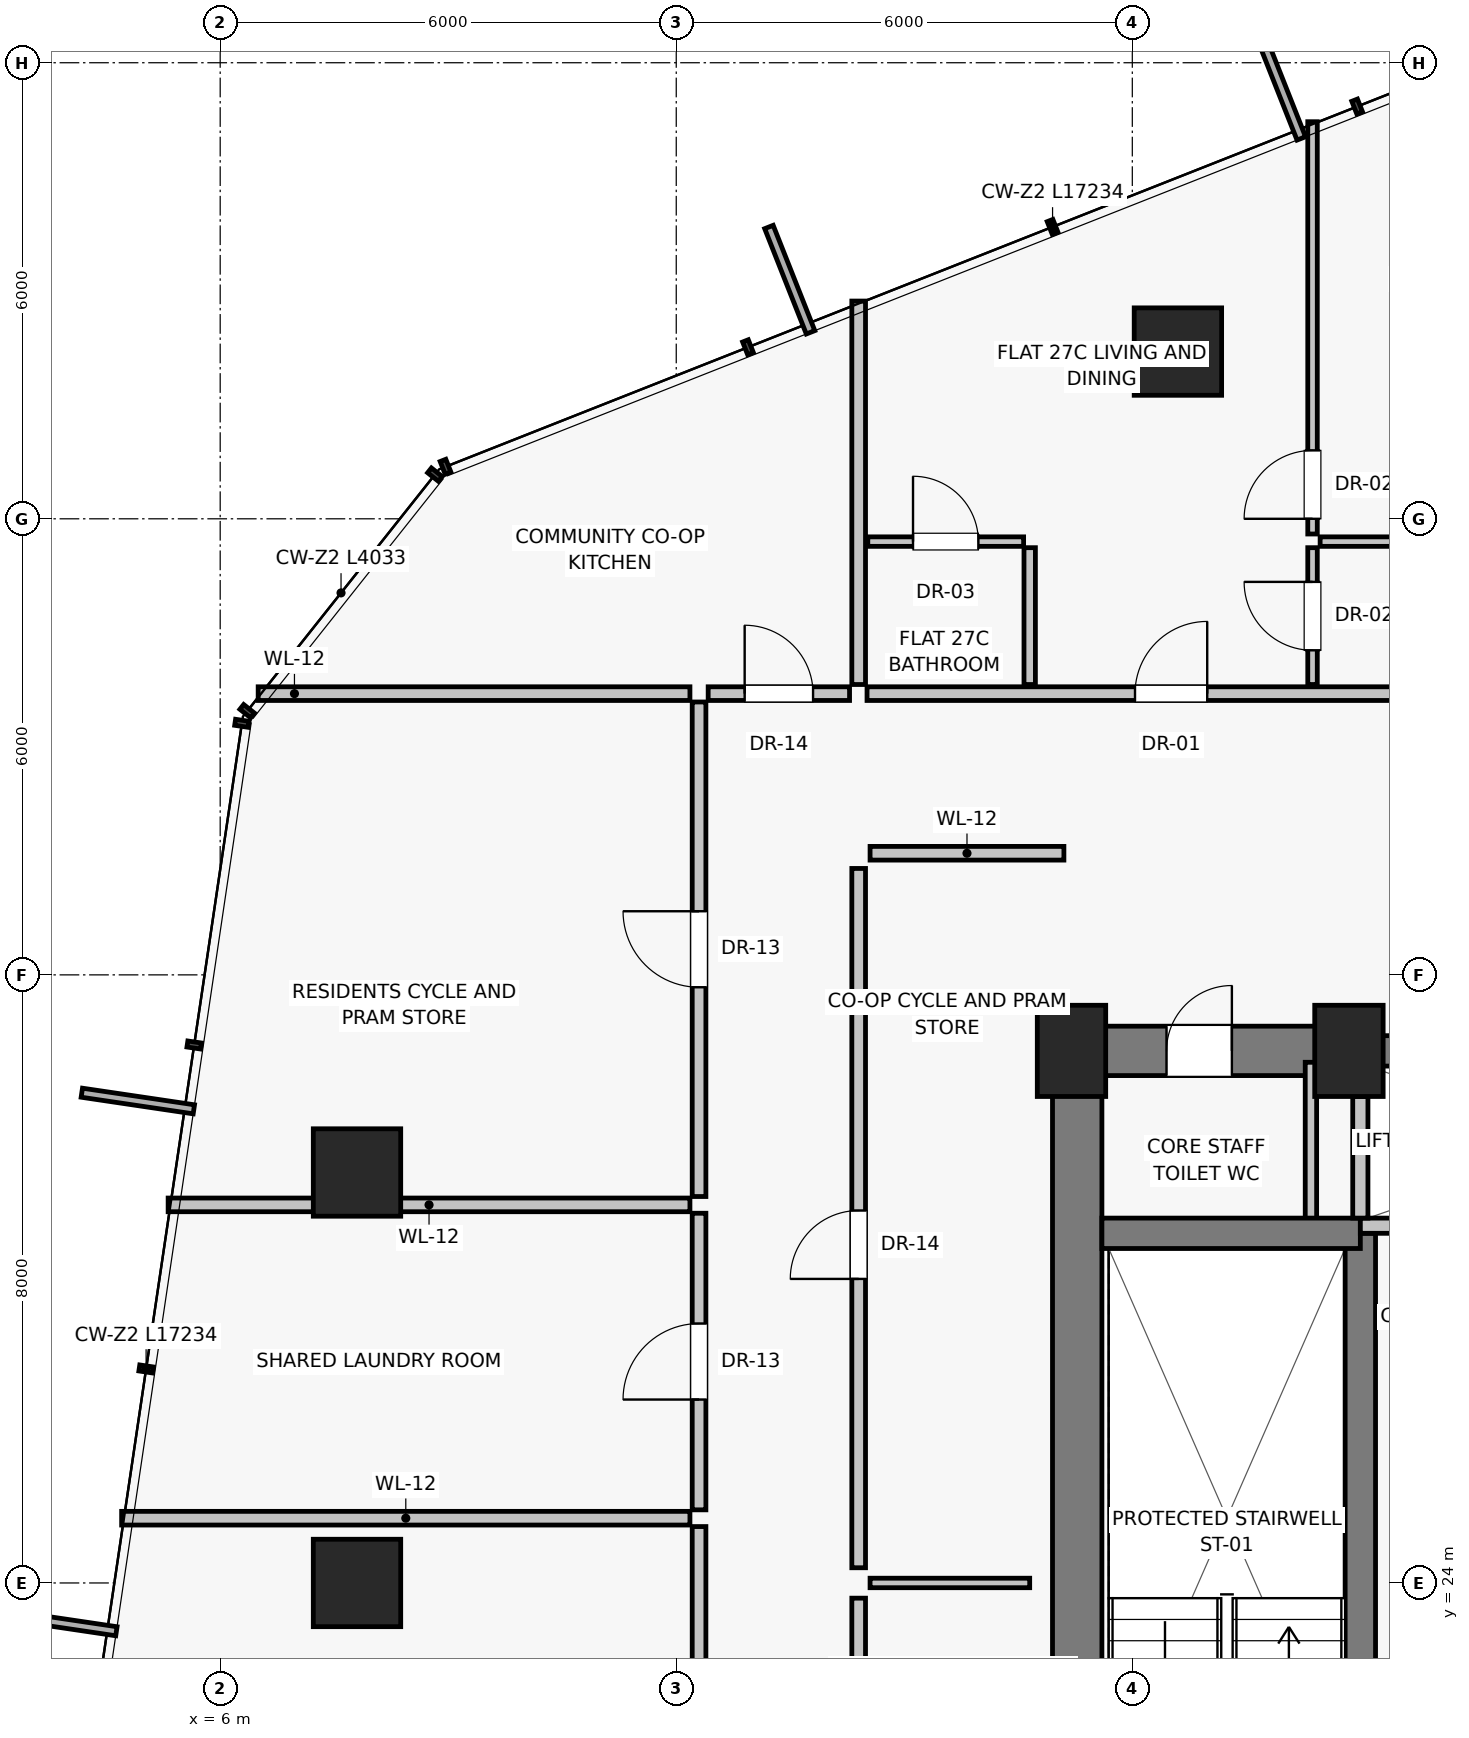
"""IFC4 building model, lengths in metres.
Left out: names, types, materials, properties, quantities, classifications, styles, units other than length and angle.
Written with IfcOpenShell. Run it as: python <this file> out.ifc"""

import sys

from ifc_helpers import new_model, si_unit, direction, frame, frame_2d, origin, origin_2d, place, context, subcontext, project, spatial, rectangle, extrude, source, transform, mapped, element, fill, save


model = new_model("IFC4")
c1 = context("Model", 3, precision=1e-05, world=origin(), true_north=direction((0.0, 1.0)))
c2 = subcontext(c1, "Body", "Model", "MODEL_VIEW")
j1 = project(units=[si_unit("LENGTHUNIT", "METRE"), si_unit("PLANEANGLEUNIT", "RADIAN")], contexts=[c1])
p1 = place(None, origin())
s1 = spatial("IfcSite", under=j1, at=p1, CompositionType="ELEMENT")
p2 = place(p1, origin())
s2 = spatial("IfcBuilding", under=s1, at=p2, CompositionType="ELEMENT")
p3 = place(p2, frame((0.0, 0.0, 99.2)))
s3 = spatial("IfcBuildingStorey", under=s2, at=p3, CompositionType="ELEMENT", Elevation=99.2)
for number, where, z_axis, x_axis in (
    (1, (17.2, 31.0, 0.0), (0.0, 0.0, 1.0), (1.0, 0.0, 0.0)),
    (2, (20.85, 31.0, 0.0), (0.0, 0.0, 1.0), (1.0, 0.0, 0.0)),
):
    element("IfcColumn", number, at=place(p3, frame(where, z_axis=z_axis, x_axis=x_axis)), inside=s3, PredefinedType="PILASTER", context=c2, shape_type="SweptSolid", body=[
        extrude(rectangle(XDim=0.9, YDim=1.2, at=origin_2d()), origin(), (0.0, 0.0, 1.0), 3.25),
    ])
for number, where, z_axis, x_axis in (
    (3, (18.6, 40.2, 0.0), (0.0, 0.0, 1.0), (1.0, 0.0, 0.0)),
    (4, (7.8, 29.4, 0.0), (0.0, 0.0, 1.0), (1.0, 0.0, 0.0)),
    (5, (7.8, 24.0, 0.0), (0.0, 0.0, 1.0), (1.0, 0.0, 0.0)),
):
    element("IfcColumn", number, at=place(p3, frame(where, z_axis=z_axis, x_axis=x_axis)), inside=s3, PredefinedType="COLUMN", context=c2, shape_type="SweptSolid", body=[
        extrude(rectangle(XDim=1.15, YDim=1.15, at=origin_2d()), origin(), (0.0, 0.0, 1.0), 3.25),
    ])
p4 = place(p3, frame((17.275, 16.8, 0.0), z_axis=(0.0, 0.0, 1.0), x_axis=(0.0, 1.0, 0.0)))
e6 = element("IfcWall", 6, at=p4, inside=s3, PredefinedType="SHEAR", context=c2, shape_type="SweptSolid", body=[
    extrude(rectangle(XDim=14.2, YDim=0.65, at=frame_2d((7.1, 0.0))), origin(), (0.0, 0.0, 1.0), 3.0),
])
p5 = place(p3, frame((17.2, 31.0, 0.0), z_axis=(0.0, 0.0, 1.0), x_axis=(1.0, 0.0, 0.0)))
e7 = element("IfcWall", 7, at=p5, inside=s3, PredefinedType="SHEAR", context=c2, shape_type="SweptSolid", body=[
    extrude(rectangle(XDim=3.8, YDim=0.65, at=frame_2d((1.9, 0.0))), origin(), (0.0, 0.0, 1.0), 3.0),
])
p6 = place(p5, frame((1.25, 0.0, 0.0)))
e8 = element("IfcOpeningElement", 8, at=p6, cuts=e7, PredefinedType="OPENING", context=c2, shape_type="SweptSolid", body=[
    extrude(rectangle(XDim=0.86, YDim=2.01, at=frame_2d((0.43, 1.005))), frame((0.0, 0.335, 0.0), z_axis=(0.0, -1.0, 0.0), x_axis=(1.0, 0.0, 0.0)), (0.0, 0.0, 1.0), 0.67),
])
p7 = place(p3, frame((21.0, 31.0, 0.0), z_axis=(0.0, 0.0, 1.0), x_axis=(1.0, 0.0, 0.0)))
e9 = element("IfcWall", 9, at=p7, inside=s3, PredefinedType="SHEAR", context=c2, shape_type="SweptSolid", body=[
    extrude(rectangle(XDim=6.0, YDim=0.4, at=frame_2d((3.0, 0.0))), origin(), (0.0, 0.0, 1.0), 3.0),
])
p8 = place(p3, frame((20.35, 28.65, 0.0), z_axis=(0.0, 0.0, 1.0), x_axis=(0.0, 1.0, 0.0)))
e10 = element("IfcWall", 10, at=p8, inside=s3, PredefinedType="PARTITIONING", context=c2, shape_type="SweptSolid", body=[
    extrude(rectangle(XDim=2.2, YDim=0.15, at=frame_2d((1.1, 0.0))), origin(), (0.0, 0.0, 1.0), 3.0),
])
p9 = place(p3, frame((21.0, 19.8, 0.0), z_axis=(0.0, 0.0, 1.0), x_axis=(0.0, 1.0, 0.0)))
e11 = element("IfcWall", 11, at=p9, inside=s3, PredefinedType="SHEAR", context=c2, shape_type="SweptSolid", body=[
    extrude(rectangle(XDim=8.8, YDim=0.4, at=frame_2d((4.4, 0.0))), origin(), (0.0, 0.0, 1.0), 3.0),
])
p10 = place(p3, frame((17.6, 28.6, 0.0), z_axis=(0.0, 0.0, 1.0), x_axis=(1.0, 0.0, 0.0)))
e12 = element("IfcWall", 12, at=p10, inside=s3, PredefinedType="SHEAR", context=c2, shape_type="SweptSolid", body=[
    extrude(rectangle(XDim=3.4, YDim=0.4, at=frame_2d((1.7, 0.0))), origin(), (0.0, 0.0, 1.0), 3.0),
])
p11 = place(p3, frame((21.0, 28.7, 0.0), z_axis=(0.0, 0.0, 1.0), x_axis=(1.0, 0.0, 0.0)))
e13 = element("IfcWall", 13, at=p11, inside=s3, PredefinedType="SOLIDWALL", context=c2, shape_type="SweptSolid", body=[
    extrude(rectangle(XDim=6.0, YDim=0.2, at=frame_2d((3.0, 0.0))), origin(), (0.0, 0.0, 1.0), 3.0),
])
p12 = place(p3, frame((21.0, 28.8, 0.0), z_axis=(0.0, 0.0, 1.0), x_axis=(0.0, 1.0, 0.0)))
e14 = element("IfcWall", 14, at=p12, inside=s3, PredefinedType="SOLIDWALL", context=c2, shape_type="SweptSolid", body=[
    extrude(rectangle(XDim=1.6, YDim=0.2, at=frame_2d((0.8, 0.0))), origin(), (0.0, 0.0, 1.0), 3.0),
])
p13 = place(p3, frame((14.4, 14.4, 0.0), z_axis=(0.0, 0.0, 1.0), x_axis=(0.0, 1.0, 0.0)))
e15 = element("IfcWall", 15, at=p13, inside=s3, PredefinedType="PARTITIONING", context=c2, shape_type="SweptSolid", body=[
    extrude(rectangle(XDim=9.4, YDim=0.18, at=frame_2d((4.7, 0.0))), origin(), (0.0, 0.0, 1.0), 3.0),
])
p14 = place(p13, frame((3.8, 0.0, 0.0)))
e16 = element("IfcOpeningElement", 16, at=p14, cuts=e15, PredefinedType="OPENING", context=c2, shape_type="SweptSolid", body=[
    extrude(rectangle(XDim=0.9, YDim=2.01, at=frame_2d((0.45, 1.005))), frame((0.0, 0.1, 0.0), z_axis=(0.0, -1.0, 0.0), x_axis=(1.0, 0.0, 0.0)), (0.0, 0.0, 1.0), 0.2),
])
p15 = place(p3, frame((14.4, 24.2, 0.0), z_axis=(0.0, 0.0, 1.0), x_axis=(0.0, 1.0, 0.0)))
e17 = element("IfcWall", 17, at=p15, inside=s3, PredefinedType="PARTITIONING", context=c2, shape_type="SweptSolid", body=[
    extrude(rectangle(XDim=9.2, YDim=0.18, at=frame_2d((4.6, 0.0))), origin(), (0.0, 0.0, 1.0), 3.0),
])
p16 = place(p15, frame((3.8, 0.0, 0.0)))
e18 = element("IfcOpeningElement", 18, at=p16, cuts=e17, PredefinedType="OPENING", context=c2, shape_type="SweptSolid", body=[
    extrude(rectangle(XDim=0.9, YDim=2.01, at=frame_2d((0.45, 1.005))), frame((0.0, 0.1, 0.0), z_axis=(0.0, -1.0, 0.0), x_axis=(1.0, 0.0, 0.0)), (0.0, 0.0, 1.0), 0.2),
])
p17 = place(p3, frame((14.55, 24.0, 0.0), z_axis=(0.0, 0.0, 1.0), x_axis=(1.0, 0.0, 0.0)))
e19 = element("IfcWall", 19, at=p17, inside=s3, PredefinedType="PARTITIONING", context=c2, shape_type="SweptSolid", body=[
    extrude(rectangle(XDim=2.1, YDim=0.125, at=frame_2d((1.05, 0.0))), origin(), (0.0, 0.0, 1.0), 3.0),
])
p18 = place(p3, frame((14.55, 33.6, 0.0), z_axis=(0.0, 0.0, 1.0), x_axis=(1.0, 0.0, 0.0)))
e20 = element("IfcWall", 20, at=p18, inside=s3, PredefinedType="PARTITIONING", context=c2, shape_type="SweptSolid", body=[
    extrude(rectangle(XDim=2.55, YDim=0.18, at=frame_2d((1.275, 0.0))), origin(), (0.0, 0.0, 1.0), 3.0),
])
p19 = place(p3, frame((14.4, 35.82, 0.0), z_axis=(0.0, 0.0, 1.0), x_axis=(0.0, 1.0, 0.0)))
e21 = element("IfcWall", 21, at=p19, inside=s3, PredefinedType="PARTITIONING", context=c2, shape_type="SweptSolid", body=[
    extrude(rectangle(XDim=5.045, YDim=0.18, at=frame_2d((2.522, 0.0))), origin(), (0.0, 0.0, 1.0), 3.0),
])
p20 = place(p3, frame((14.51, 35.7, 0.0), z_axis=(0.0, 0.0, 1.0), x_axis=(1.0, 0.0, 0.0)))
e22 = element("IfcWall", 22, at=p20, inside=s3, PredefinedType="PARTITIONING", context=c2, shape_type="SweptSolid", body=[
    extrude(rectangle(XDim=10.636, YDim=0.18, at=frame_2d((5.318, 0.0))), origin(), (0.0, 0.0, 1.0), 2.58),
])
p21 = place(p20, frame((3.525, 0.0, 0.0)))
e23 = element("IfcOpeningElement", 23, at=p21, cuts=e22, PredefinedType="OPENING", context=c2, shape_type="SweptSolid", body=[
    extrude(rectangle(XDim=0.95, YDim=2.02, at=frame_2d((0.475, 1.01))), frame((0.0, 0.1, 0.0), z_axis=(0.0, -1.0, 0.0), x_axis=(1.0, 0.0, 0.0)), (0.0, 0.0, 1.0), 0.2),
])
p22 = place(p3, frame((16.65, 35.82, 0.0), z_axis=(0.0, 0.0, 1.0), x_axis=(0.0, 1.0, 0.0)))
e24 = element("IfcWall", 24, at=p22, inside=s3, PredefinedType="PARTITIONING", context=c2, shape_type="SweptSolid", body=[
    extrude(rectangle(XDim=1.8, YDim=0.15, at=frame_2d((0.9, 0.0))), origin(), (0.0, 0.0, 1.0), 3.0),
])
p23 = place(p3, frame((14.52, 37.7, 0.0), z_axis=(0.0, 0.0, 1.0), x_axis=(1.0, 0.0, 0.0)))
e25 = element("IfcWall", 25, at=p23, inside=s3, PredefinedType="PARTITIONING", context=c2, shape_type="SweptSolid", body=[
    extrude(rectangle(XDim=2.05, YDim=0.125, at=frame_2d((1.025, 0.0))), origin(), (0.0, 0.0, 1.0), 3.0),
])
p24 = place(p23, frame((0.595, 0.0, 0.0)))
e26 = element("IfcOpeningElement", 26, at=p24, cuts=e25, PredefinedType="OPENING", context=c2, shape_type="SweptSolid", body=[
    extrude(rectangle(XDim=0.86, YDim=2.01, at=frame_2d((0.43, 1.005))), frame((0.0, 0.073, 0.0), z_axis=(0.0, -1.0, 0.0), x_axis=(1.0, 0.0, 0.0)), (0.0, 0.0, 1.0), 0.145),
])
p25 = place(p3, frame((20.371, 35.82, 0.0), z_axis=(0.0, 0.0, 1.0), x_axis=(0.0, 1.0, 0.0)))
e27 = element("IfcWall", 27, at=p25, inside=s3, PredefinedType="PARTITIONING", context=c2, shape_type="SweptSolid", body=[
    extrude(rectangle(XDim=1.8, YDim=0.125, at=frame_2d((0.9, 0.0))), origin(), (0.0, 0.0, 1.0), 3.0),
])
p26 = place(p25, frame((0.45, 0.0, 0.0)))
e28 = element("IfcOpeningElement", 28, at=p26, cuts=e27, PredefinedType="OPENING", context=c2, shape_type="SweptSolid", body=[
    extrude(rectangle(XDim=0.9, YDim=2.01, at=frame_2d((0.45, 1.005))), frame((0.0, 0.073, 0.0), z_axis=(0.0, -1.0, 0.0), x_axis=(1.0, 0.0, 0.0)), (0.0, 0.0, 1.0), 0.145),
])
p27 = place(p3, frame((20.471, 37.7, 0.0), z_axis=(0.0, 0.0, 1.0), x_axis=(1.0, 0.0, 0.0)))
e29 = element("IfcWall", 29, at=p27, inside=s3, PredefinedType="PARTITIONING", context=c2, shape_type="SweptSolid", body=[
    extrude(rectangle(XDim=4.665, YDim=0.125, at=frame_2d((2.333, 0.0))), origin(), (0.0, 0.0, 1.0), 3.0),
])
p28 = place(p3, frame((20.371, 37.8, 0.0), z_axis=(0.0, 0.0, 1.0), x_axis=(0.0, 1.0, 0.0)))
e30 = element("IfcWall", 30, at=p28, inside=s3, PredefinedType="PARTITIONING", context=c2, shape_type="SweptSolid", body=[
    extrude(rectangle(XDim=5.424, YDim=0.125, at=frame_2d((2.712, 0.0))), origin(), (0.0, 0.0, 1.0), 3.0),
])
p29 = place(p28, frame((0.2, 0.0, 0.0)))
e31 = element("IfcOpeningElement", 31, at=p29, cuts=e30, PredefinedType="OPENING", context=c2, shape_type="SweptSolid", body=[
    extrude(rectangle(XDim=0.9, YDim=2.01, at=frame_2d((0.45, 1.005))), frame((0.0, 0.073, 0.0), z_axis=(0.0, -1.0, 0.0), x_axis=(1.0, 0.0, 0.0)), (0.0, 0.0, 1.0), 0.145),
])
p30 = place(p3, frame((12.18, 35.7, 0.0), z_axis=(0.0, 0.0, 1.0), x_axis=(-1.0, 0.0, 0.0)))
e32 = element("IfcWall", 32, at=p30, inside=s3, PredefinedType="PARTITIONING", context=c2, shape_type="SweptSolid", body=[
    extrude(rectangle(XDim=5.68, YDim=0.18, at=frame_2d((2.84, 0.0))), origin(), (0.0, 0.0, 1.0), 3.0),
])
p31 = place(p3, frame((12.3, 17.056, 0.0), z_axis=(0.0, 0.0, 1.0), x_axis=(0.0, 1.0, 0.0)))
e33 = element("IfcWall", 33, at=p31, inside=s3, PredefinedType="PARTITIONING", context=c2, shape_type="SweptSolid", body=[
    extrude(rectangle(XDim=7.686, YDim=0.18, at=frame_2d((3.843, 0.0))), origin(), (0.0, 0.0, 1.0), 2.58),
])
p32 = place(p31, frame((3.343, 0.0, 0.0)))
e34 = element("IfcOpeningElement", 34, at=p32, cuts=e33, PredefinedType="OPENING", context=c2, shape_type="SweptSolid", body=[
    extrude(rectangle(XDim=1.0, YDim=2.01, at=frame_2d((0.5, 1.005))), frame((0.0, 0.1, 0.0), z_axis=(0.0, -1.0, 0.0), x_axis=(1.0, 0.0, 0.0)), (0.0, 0.0, 1.0), 0.2),
])
p33 = place(p3, frame((12.18, 24.852, 0.0), z_axis=(0.0, 0.0, 1.0), x_axis=(-1.0, 0.0, 0.0)))
e35 = element("IfcWall", 35, at=p33, inside=s3, PredefinedType="PARTITIONING", context=c2, shape_type="SweptSolid", body=[
    extrude(rectangle(XDim=7.476, YDim=0.18, at=frame_2d((3.738, 0.0))), origin(), (0.0, 0.0, 1.0), 3.0),
])
p34 = place(p3, frame((12.3, 24.962, 0.0), z_axis=(0.0, 0.0, 1.0), x_axis=(0.0, 1.0, 0.0)))
e36 = element("IfcWall", 36, at=p34, inside=s3, PredefinedType="PARTITIONING", context=c2, shape_type="SweptSolid", body=[
    extrude(rectangle(XDim=3.902, YDim=0.18, at=frame_2d((1.951, 0.0))), origin(), (0.0, 0.0, 1.0), 2.58),
])
p35 = place(p34, frame((1.451, 0.0, 0.0)))
e37 = element("IfcOpeningElement", 37, at=p35, cuts=e36, PredefinedType="OPENING", context=c2, shape_type="SweptSolid", body=[
    extrude(rectangle(XDim=1.0, YDim=2.01, at=frame_2d((0.5, 1.005))), frame((0.0, 0.1, 0.0), z_axis=(0.0, -1.0, 0.0), x_axis=(1.0, 0.0, 0.0)), (0.0, 0.0, 1.0), 0.2),
])
p36 = place(p3, frame((12.3, 29.084, 0.0), z_axis=(0.0, 0.0, 1.0), x_axis=(0.0, 1.0, 0.0)))
e38 = element("IfcWall", 38, at=p36, inside=s3, PredefinedType="PARTITIONING", context=c2, shape_type="SweptSolid", body=[
    extrude(rectangle(XDim=6.506, YDim=0.18, at=frame_2d((3.253, 0.0))), origin(), (0.0, 0.0, 1.0), 2.58),
])
p37 = place(p36, frame((2.753, 0.0, 0.0)))
e39 = element("IfcOpeningElement", 39, at=p37, cuts=e38, PredefinedType="OPENING", context=c2, shape_type="SweptSolid", body=[
    extrude(rectangle(XDim=1.0, YDim=2.01, at=frame_2d((0.5, 1.005))), frame((0.0, 0.1, 0.0), z_axis=(0.0, -1.0, 0.0), x_axis=(1.0, 0.0, 0.0)), (0.0, 0.0, 1.0), 0.2),
])
p38 = place(p3, frame((12.18, 28.974, 0.0), z_axis=(0.0, 0.0, 1.0), x_axis=(-1.0, 0.0, 0.0)))
e40 = element("IfcWall", 40, at=p38, inside=s3, PredefinedType="PARTITIONING", context=c2, shape_type="SweptSolid", body=[
    extrude(rectangle(XDim=6.865, YDim=0.18, at=frame_2d((3.432, 0.0))), origin(), (0.0, 0.0, 1.0), 2.378),
])
p39 = place(p3, frame((12.42, 35.7, 0.0), z_axis=(0.0, 0.0, 1.0), x_axis=(1.0, 0.0, 0.0)))
e41 = element("IfcWall", 41, at=p39, inside=s3, PredefinedType="PARTITIONING", context=c2, shape_type="SweptSolid", body=[
    extrude(rectangle(XDim=1.86, YDim=0.18, at=frame_2d((0.93, 0.0))), origin(), (0.0, 0.0, 1.0), 3.0),
])
p40 = place(p39, frame((0.48, 0.0, 0.0)))
e42 = element("IfcOpeningElement", 42, at=p40, cuts=e41, PredefinedType="OPENING", context=c2, shape_type="SweptSolid", body=[
    extrude(rectangle(XDim=0.9, YDim=2.01, at=frame_2d((0.45, 1.005))), frame((0.0, 0.1, 0.0), z_axis=(0.0, -1.0, 0.0), x_axis=(1.0, 0.0, 0.0)), (0.0, 0.0, 1.0), 0.2),
])
m1 = source(origin(), c2, "Body", "SweptSolid", [
    extrude(rectangle(XDim=0.86, YDim=2.01, at=frame_2d((0.43, 1.005))), frame((0.0, 0.025, 0.0), z_axis=(0.0, -1.0, 0.0), x_axis=(1.0, 0.0, 0.0)), (0.0, 0.0, 1.0), 0.05),
])
p41 = place(p6, origin())
e43 = element("IfcDoor", 43, at=p41, inside=s3, OperationType="SINGLE_SWING_RIGHT", PredefinedType="DOOR", context=c2, shape_type="MappedRepresentation", body=[
    mapped(m1, transform((0.0, 0.0, 0.0), scale=1.0)),
])
fill(e8, e43)
m2 = source(origin(), c2, "Body", "SweptSolid", [
    extrude(rectangle(XDim=0.9, YDim=2.01, at=frame_2d((0.45, 1.005))), frame((0.0, 0.025, 0.0), z_axis=(0.0, -1.0, 0.0), x_axis=(1.0, 0.0, 0.0)), (0.0, 0.0, 1.0), 0.05),
])
p42 = place(p16, origin())
e44 = element("IfcDoor", 44, at=p42, inside=s3, OperationType="SINGLE_SWING_LEFT", PredefinedType="DOOR", context=c2, shape_type="MappedRepresentation", body=[
    mapped(m2, transform((0.0, 0.0, 0.0), scale=1.0)),
])
fill(e18, e44)
m3 = source(origin(), c2, "Body", "SweptSolid", [
    extrude(rectangle(XDim=0.95, YDim=2.02, at=frame_2d((0.475, 1.01))), frame((0.0, 0.025, 0.0), z_axis=(0.0, -1.0, 0.0), x_axis=(1.0, 0.0, 0.0)), (0.0, 0.0, 1.0), 0.05),
])
p43 = place(p21, origin())
e45 = element("IfcDoor", 45, at=p43, inside=s3, OperationType="SINGLE_SWING_RIGHT", PredefinedType="DOOR", context=c2, shape_type="MappedRepresentation", body=[
    mapped(m3, transform((0.0, 0.0, 0.0), scale=1.0)),
])
fill(e23, e45)
p44 = place(p24, origin())
e46 = element("IfcDoor", 46, at=p44, inside=s3, OperationType="SINGLE_SWING_LEFT", PredefinedType="DOOR", context=c2, shape_type="MappedRepresentation", body=[
    mapped(m1, transform((0.0, 0.0, 0.0), scale=1.0)),
])
fill(e26, e46)
p45 = place(p26, origin())
e47 = element("IfcDoor", 47, at=p45, inside=s3, OperationType="SINGLE_SWING_RIGHT", PredefinedType="DOOR", context=c2, shape_type="MappedRepresentation", body=[
    mapped(m2, transform((0.0, 0.0, 0.0), scale=1.0)),
])
fill(e28, e47)
p46 = place(p29, origin())
e48 = element("IfcDoor", 48, at=p46, inside=s3, OperationType="SINGLE_SWING_LEFT", PredefinedType="DOOR", context=c2, shape_type="MappedRepresentation", body=[
    mapped(m2, transform((0.0, 0.0, 0.0), scale=1.0)),
])
fill(e31, e48)
m4 = source(origin(), c2, "Body", "SweptSolid", [
    extrude(rectangle(XDim=1.0, YDim=2.01, at=frame_2d((0.5, 1.005))), frame((0.0, 0.025, 0.0), z_axis=(0.0, -1.0, 0.0), x_axis=(1.0, 0.0, 0.0)), (0.0, 0.0, 1.0), 0.05),
])
p47 = place(p35, origin())
e49 = element("IfcDoor", 49, at=p47, inside=s3, OperationType="SINGLE_SWING_LEFT", PredefinedType="DOOR", context=c2, shape_type="MappedRepresentation", body=[
    mapped(m4, transform((0.0, 0.0, 0.0), scale=1.0)),
])
fill(e37, e49)
p48 = place(p37, origin())
e50 = element("IfcDoor", 50, at=p48, inside=s3, OperationType="SINGLE_SWING_RIGHT", PredefinedType="DOOR", context=c2, shape_type="MappedRepresentation", body=[
    mapped(m4, transform((0.0, 0.0, 0.0), scale=1.0)),
])
fill(e39, e50)
p49 = place(p40, origin())
e51 = element("IfcDoor", 51, at=p49, inside=s3, OperationType="SINGLE_SWING_LEFT", PredefinedType="DOOR", context=c2, shape_type="MappedRepresentation", body=[
    mapped(m2, transform((0.0, 0.0, 0.0), scale=1.0)),
])
fill(e42, e51)
save(model, sys.argv[1])
